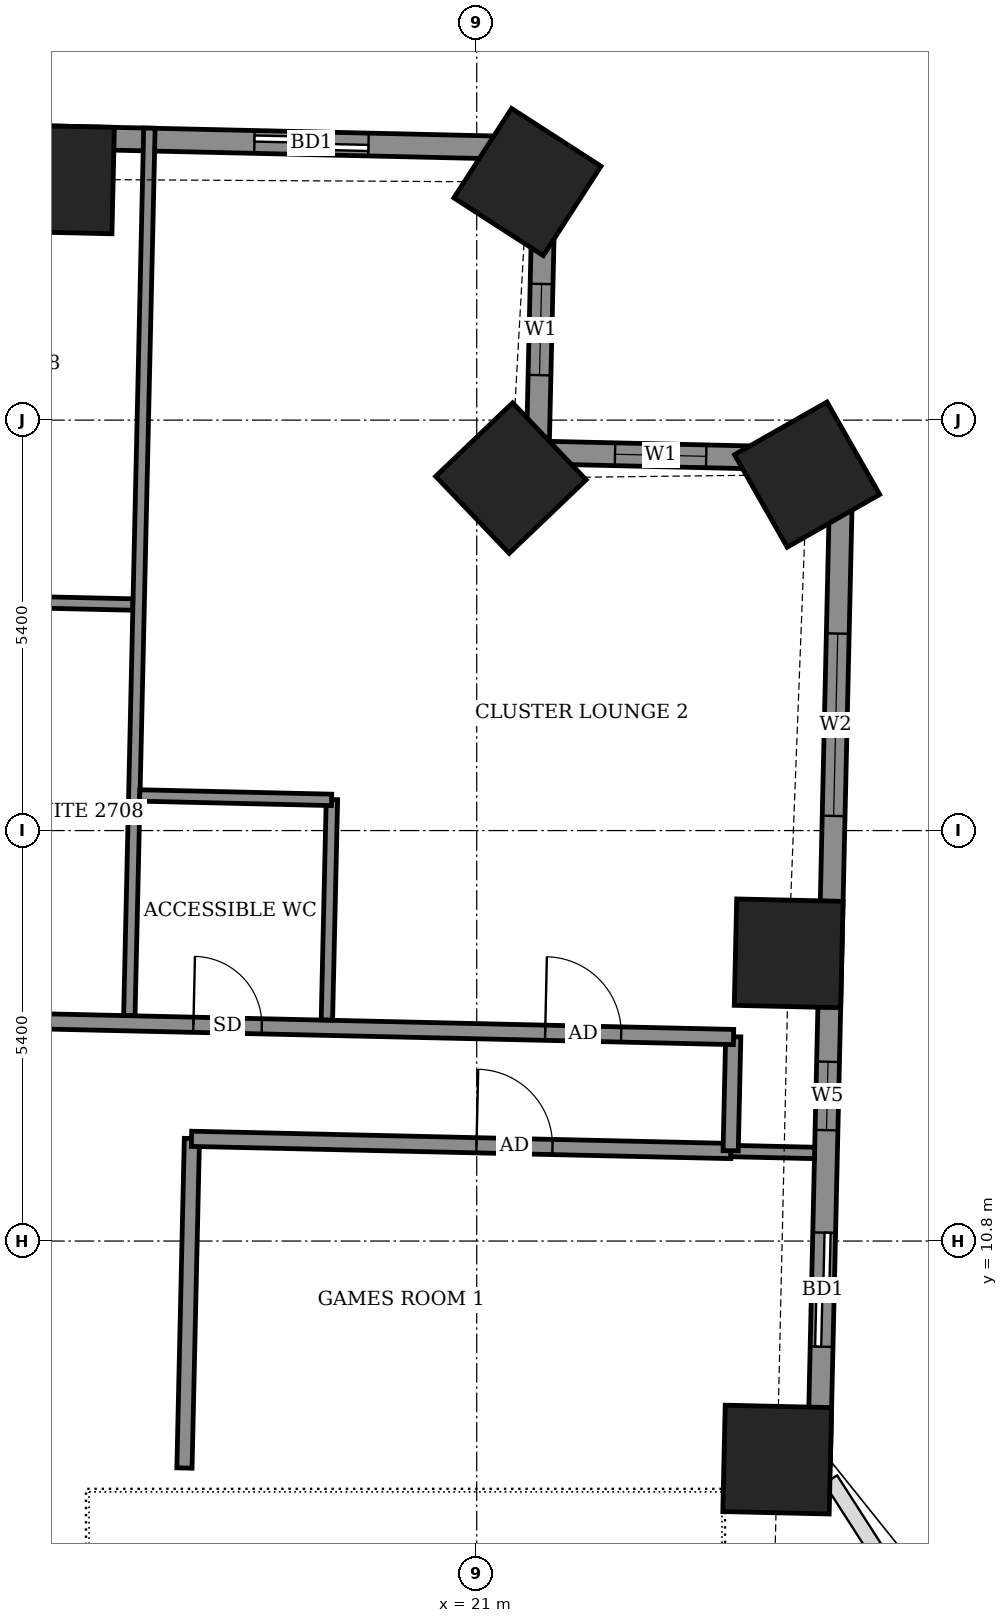
"""IFC4 building model, lengths in metres.
Left out: names, types, materials, properties, quantities, classifications, styles, units other than length and angle.
Written with IfcOpenShell. Run it as: python <this file> out.ifc"""

import sys

from ifc_helpers import new_model, si_unit, direction, frame, frame_2d, origin, origin_2d, place, context, subcontext, project, spatial, rectangle, extrude, element, fill, save


model = new_model("IFC4")
c1 = context("Model", 3, precision=1e-05, world=origin(), true_north=direction((0.0, 1.0)))
c2 = subcontext(c1, "Body", "Model", "MODEL_VIEW")
j1 = project(units=[si_unit("LENGTHUNIT", "METRE"), si_unit("PLANEANGLEUNIT", "RADIAN")], contexts=[c1])
p1 = place(None, origin())
s1 = spatial("IfcSite", under=j1, at=p1, CompositionType="ELEMENT")
p2 = place(p1, origin())
s2 = spatial("IfcBuilding", under=s1, at=p2, CompositionType="ELEMENT")
p3 = place(p2, frame((0.0, 0.0, 109.1)))
s3 = spatial("IfcBuildingStorey", under=s2, at=p3, CompositionType="ELEMENT", Elevation=109.1)
for number, where, z_axis, x_axis in (
    (1, (24.953, 7.925, -0.55), (0.0, 0.0, 1.0), (0.023, 1.0, 0.0)),
    (2, (25.104, 14.585, -0.55), (0.0, 0.0, 1.0), (0.023, 1.0, 0.0)),
    (3, (25.347, 20.883, -0.55), (0.0, 0.0, 1.0), (-0.495, 0.869, 0.0)),
    (4, (21.45, 20.837, -0.55), (0.0, 0.0, 1.0), (-0.691, 0.723, 0.0)),
    (5, (21.667, 24.732, -0.55), (0.0, 0.0, 1.0), (-0.84, 0.542, 0.0)),
    (6, (15.517, 24.767, -0.55), (0.0, 0.0, 1.0), (-1.0, 0.023, 0.0)),
):
    element("IfcColumn", number, at=place(p3, frame(where, z_axis=z_axis, x_axis=x_axis)), inside=s3, PredefinedType="COLUMN", context=c2, shape_type="SweptSolid", body=[
        extrude(rectangle(XDim=1.4, YDim=1.4, at=origin_2d()), origin(), (0.0, 0.0, 1.0), 3.6),
    ])
p4 = place(p3, frame((25.502, 7.857, 0.0), z_axis=(0.0, 0.0, 1.0), x_axis=(0.022680323815, 0.999742768372, 0.0)))
e7 = element("IfcWall", 7, at=p4, inside=s3, PredefinedType="SOLIDWALL", context=c2, shape_type="SweptSolid", body=[
    extrude(rectangle(XDim=13.229, YDim=0.3, at=frame_2d((6.615, 0.0))), origin(), (0.0, 0.0, 1.0), 3.05),
])
p5 = place(p4, frame((1.554, 0.0, 0.0)))
e8 = element("IfcOpeningElement", 8, at=p5, cuts=e7, PredefinedType="OPENING", context=c2, shape_type="SweptSolid", body=[
    extrude(rectangle(XDim=1.5, YDim=2.4, at=frame_2d((0.75, 1.2))), frame((0.0, 0.16, 0.0), z_axis=(0.0, -1.0, 0.0), x_axis=(1.0, 0.0, 0.0)), (0.0, 0.0, 1.0), 0.32),
])
p6 = place(p4, frame((4.403, 0.0, 0.9)))
e9 = element("IfcOpeningElement", 9, at=p6, cuts=e7, PredefinedType="OPENING", context=c2, shape_type="SweptSolid", body=[
    extrude(rectangle(XDim=0.9, YDim=1.5, at=frame_2d((0.45, 0.75))), frame((0.0, 0.16, 0.0), z_axis=(0.0, -1.0, 0.0), x_axis=(1.0, 0.0, 0.0)), (0.0, 0.0, 1.0), 0.32),
])
p7 = place(p4, frame((8.538, 0.0, 0.9)))
e10 = element("IfcOpeningElement", 10, at=p7, cuts=e7, PredefinedType="OPENING", context=c2, shape_type="SweptSolid", body=[
    extrude(rectangle(XDim=2.4, YDim=1.5, at=frame_2d((1.2, 0.75))), frame((0.0, 0.16, 0.0), z_axis=(0.0, -1.0, 0.0), x_axis=(1.0, 0.0, 0.0)), (0.0, 0.0, 1.0), 0.32),
])
p8 = place(p3, frame((25.802, 21.083, 0.0), z_axis=(0.0, 0.0, 1.0), x_axis=(-0.999740826251, 0.022765770952, 0.0)))
e11 = element("IfcWall", 11, at=p8, inside=s3, PredefinedType="SOLIDWALL", context=c2, shape_type="SweptSolid", body=[
    extrude(rectangle(XDim=4.0, YDim=0.3, at=frame_2d((2.0, 0.0))), origin(), (0.0, 0.0, 1.0), 2.55),
])
p9 = place(p8, frame((1.783, 0.0, 0.9)))
e12 = element("IfcOpeningElement", 12, at=p9, cuts=e11, PredefinedType="OPENING", context=c2, shape_type="SweptSolid", body=[
    extrude(rectangle(XDim=1.2, YDim=1.5, at=frame_2d((0.6, 0.75))), frame((0.0, 0.16, 0.0), z_axis=(0.0, -1.0, 0.0), x_axis=(1.0, 0.0, 0.0)), (0.0, 0.0, 1.0), 0.32),
])
p10 = place(p3, frame((21.803, 21.174, 0.0), z_axis=(0.0, 0.0, 1.0), x_axis=(0.022765770952, 0.999740826251, 0.0)))
e13 = element("IfcWall", 13, at=p10, inside=s3, PredefinedType="SOLIDWALL", context=c2, shape_type="SweptSolid", body=[
    extrude(rectangle(XDim=4.0, YDim=0.3, at=frame_2d((2.0, 0.0))), origin(), (0.0, 0.0, 1.0), 2.55),
])
p11 = place(p10, frame((1.018, 0.0, 0.9)))
e14 = element("IfcOpeningElement", 14, at=p11, cuts=e13, PredefinedType="OPENING", context=c2, shape_type="SweptSolid", body=[
    extrude(rectangle(XDim=1.2, YDim=1.5, at=frame_2d((0.6, 0.75))), frame((0.0, 0.16, 0.0), z_axis=(0.0, -1.0, 0.0), x_axis=(1.0, 0.0, 0.0)), (0.0, 0.0, 1.0), 0.32),
])
p12 = place(p3, frame((21.894, 25.173, 0.0), z_axis=(0.0, 0.0, 1.0), x_axis=(-0.999742661083, 0.022685052594, 0.0)))
e15 = element("IfcWall", 15, at=p12, inside=s3, PredefinedType="SOLIDWALL", context=c2, shape_type="SweptSolid", body=[
    extrude(rectangle(XDim=45.309, YDim=0.3, at=frame_2d((22.654, 0.0))), origin(), (0.0, 0.0, 1.0), 3.05),
])
p13 = place(p12, frame((2.319, 0.0, 0.0)))
e16 = element("IfcOpeningElement", 16, at=p13, cuts=e15, PredefinedType="OPENING", context=c2, shape_type="SweptSolid", body=[
    extrude(rectangle(XDim=1.5, YDim=2.4, at=frame_2d((0.75, 1.2))), frame((0.0, 0.16, 0.0), z_axis=(0.0, -1.0, 0.0), x_axis=(1.0, 0.0, 0.0)), (0.0, 0.0, 1.0), 0.32),
])
p14 = place(p12, frame((7.437, 0.0, 0.0)))
e17 = element("IfcOpeningElement", 17, at=p14, cuts=e15, PredefinedType="OPENING", context=c2, shape_type="SweptSolid", body=[
    extrude(rectangle(XDim=1.5, YDim=2.4, at=frame_2d((0.75, 1.2))), frame((0.0, 0.16, 0.0), z_axis=(0.0, -1.0, 0.0), x_axis=(1.0, 0.0, 0.0)), (0.0, 0.0, 1.0), 0.32),
])
p15 = place(p12, frame((10.244, 0.0, 0.0)))
e18 = element("IfcOpeningElement", 18, at=p15, cuts=e15, PredefinedType="OPENING", context=c2, shape_type="SweptSolid", body=[
    extrude(rectangle(XDim=1.5, YDim=2.4, at=frame_2d((0.75, 1.2))), frame((0.0, 0.16, 0.0), z_axis=(0.0, -1.0, 0.0), x_axis=(1.0, 0.0, 0.0)), (0.0, 0.0, 1.0), 0.32),
])
p16 = place(p12, frame((15.583, 0.0, 0.0)))
e19 = element("IfcOpeningElement", 19, at=p16, cuts=e15, PredefinedType="OPENING", context=c2, shape_type="SweptSolid", body=[
    extrude(rectangle(XDim=1.5, YDim=2.4, at=frame_2d((0.75, 1.2))), frame((0.0, 0.16, 0.0), z_axis=(0.0, -1.0, 0.0), x_axis=(1.0, 0.0, 0.0)), (0.0, 0.0, 1.0), 0.32),
])
p17 = place(p12, frame((20.677, 0.0, 0.0)))
e20 = element("IfcOpeningElement", 20, at=p17, cuts=e15, PredefinedType="OPENING", context=c2, shape_type="SweptSolid", body=[
    extrude(rectangle(XDim=1.5, YDim=2.4, at=frame_2d((0.75, 1.2))), frame((0.0, 0.16, 0.0), z_axis=(0.0, -1.0, 0.0), x_axis=(1.0, 0.0, 0.0)), (0.0, 0.0, 1.0), 0.32),
])
p18 = place(p12, frame((23.485, 0.0, 0.0)))
e21 = element("IfcOpeningElement", 21, at=p18, cuts=e15, PredefinedType="OPENING", context=c2, shape_type="SweptSolid", body=[
    extrude(rectangle(XDim=1.5, YDim=2.4, at=frame_2d((0.75, 1.2))), frame((0.0, 0.16, 0.0), z_axis=(0.0, -1.0, 0.0), x_axis=(1.0, 0.0, 0.0)), (0.0, 0.0, 1.0), 0.32),
])
p19 = place(p12, frame((28.708, 0.0, 0.0)))
e22 = element("IfcOpeningElement", 22, at=p19, cuts=e15, PredefinedType="OPENING", context=c2, shape_type="SweptSolid", body=[
    extrude(rectangle(XDim=1.5, YDim=2.4, at=frame_2d((0.75, 1.2))), frame((0.0, 0.16, 0.0), z_axis=(0.0, -1.0, 0.0), x_axis=(1.0, 0.0, 0.0)), (0.0, 0.0, 1.0), 0.32),
])
p20 = place(p12, frame((33.793, 0.0, 0.0)))
e23 = element("IfcOpeningElement", 23, at=p20, cuts=e15, PredefinedType="OPENING", context=c2, shape_type="SweptSolid", body=[
    extrude(rectangle(XDim=1.5, YDim=2.4, at=frame_2d((0.75, 1.2))), frame((0.0, 0.16, 0.0), z_axis=(0.0, -1.0, 0.0), x_axis=(1.0, 0.0, 0.0)), (0.0, 0.0, 1.0), 0.32),
])
p21 = place(p12, frame((36.6, 0.0, 0.0)))
e24 = element("IfcOpeningElement", 24, at=p21, cuts=e15, PredefinedType="OPENING", context=c2, shape_type="SweptSolid", body=[
    extrude(rectangle(XDim=1.5, YDim=2.4, at=frame_2d((0.75, 1.2))), frame((0.0, 0.16, 0.0), z_axis=(0.0, -1.0, 0.0), x_axis=(1.0, 0.0, 0.0)), (0.0, 0.0, 1.0), 0.32),
])
p22 = place(p12, frame((41.318, 0.0, 0.9)))
e25 = element("IfcOpeningElement", 25, at=p22, cuts=e15, PredefinedType="OPENING", context=c2, shape_type="SweptSolid", body=[
    extrude(rectangle(XDim=2.4, YDim=1.5, at=frame_2d((1.2, 0.75))), frame((0.0, 0.16, 0.0), z_axis=(0.0, -1.0, 0.0), x_axis=(1.0, 0.0, 0.0)), (0.0, 0.0, 1.0), 0.32),
])
p23 = place(p3, frame((17.155, 7.814, 0.0), z_axis=(0.0, 0.0, 1.0), x_axis=(0.022578158225, 0.999745080894, 0.0)))
e26 = element("IfcWall", 26, at=p23, inside=s3, PredefinedType="PARTITIONING", context=c2, shape_type="SweptSolid", body=[
    extrude(rectangle(XDim=4.336, YDim=0.2, at=frame_2d((2.168, 0.0))), origin(), (0.0, 0.0, 1.0), 3.05),
])
p24 = place(p3, frame((17.248, 12.145, 0.0), z_axis=(0.0, 0.0, 1.0), x_axis=(0.999742350192, -0.022698749566, 0.0)))
e27 = element("IfcWall", 27, at=p24, inside=s3, PredefinedType="PARTITIONING", context=c2, shape_type="SweptSolid", body=[
    extrude(rectangle(XDim=7.099, YDim=0.2, at=frame_2d((3.549, 0.0))), origin(), (0.0, 0.0, 1.0), 3.05),
])
p25 = place(p24, frame((3.75, 0.0, 0.0)))
e28 = element("IfcOpeningElement", 28, at=p25, cuts=e27, PredefinedType="OPENING", context=c2, shape_type="SweptSolid", body=[
    extrude(rectangle(XDim=1.0, YDim=2.1, at=frame_2d((0.5, 1.05))), frame((0.0, 0.11, 0.0), z_axis=(0.0, -1.0, 0.0), x_axis=(1.0, 0.0, 0.0)), (0.0, 0.0, 1.0), 0.22),
])
p26 = place(p3, frame((24.345, 11.984, 0.0), z_axis=(0.0, 0.0, 1.0), x_axis=(0.9997438932, -0.022630687329, 0.0)))
e29 = element("IfcWall", 29, at=p26, inside=s3, PredefinedType="PARTITIONING", context=c2, shape_type="SweptSolid", body=[
    extrude(rectangle(XDim=1.1, YDim=0.15, at=frame_2d((0.55, 0.0))), origin(), (0.0, 0.0, 1.0), 2.55),
])
p27 = place(p3, frame((24.341, 11.988, 0.0), z_axis=(0.0, 0.0, 1.0), x_axis=(0.022617910375, 0.999744182344, 0.0)))
e30 = element("IfcWall", 30, at=p27, inside=s3, PredefinedType="PARTITIONING", context=c2, shape_type="SweptSolid", body=[
    extrude(rectangle(XDim=1.5, YDim=0.2, at=frame_2d((0.75, 0.0))), origin(), (0.0, 0.0, 1.0), 3.05),
])
p28 = place(p3, frame((-26.316, 14.634, 0.0), z_axis=(0.0, 0.0, 1.0), x_axis=(0.999742734556, -0.02268181435, 0.0)))
e31 = element("IfcWall", 31, at=p28, inside=s3, PredefinedType="PARTITIONING", context=c2, shape_type="SweptSolid", body=[
    extrude(rectangle(XDim=50.708, YDim=0.2, at=frame_2d((25.354, 0.0))), origin(), (0.0, 0.0, 1.0), 3.05),
])
p29 = place(p28, frame((48.229, 0.0, 0.0)))
e32 = element("IfcOpeningElement", 32, at=p29, cuts=e31, PredefinedType="OPENING", context=c2, shape_type="SweptSolid", body=[
    extrude(rectangle(XDim=1.0, YDim=2.1, at=frame_2d((0.5, 1.05))), frame((0.0, 0.11, 0.0), z_axis=(0.0, -1.0, 0.0), x_axis=(1.0, 0.0, 0.0)), (0.0, 0.0, 1.0), 0.22),
])
p30 = place(p28, frame((43.6, 0.0, 0.0)))
e33 = element("IfcOpeningElement", 33, at=p30, cuts=e31, PredefinedType="OPENING", context=c2, shape_type="SweptSolid", body=[
    extrude(rectangle(XDim=0.9, YDim=2.1, at=frame_2d((0.45, 1.05))), frame((0.0, 0.11, 0.0), z_axis=(0.0, -1.0, 0.0), x_axis=(1.0, 0.0, 0.0)), (0.0, 0.0, 1.0), 0.22),
])
p31 = place(p28, frame((38.925, 0.0, 0.0)))
e34 = element("IfcOpeningElement", 34, at=p31, cuts=e31, PredefinedType="OPENING", context=c2, shape_type="SweptSolid", body=[
    extrude(rectangle(XDim=0.9, YDim=2.1, at=frame_2d((0.45, 1.05))), frame((0.0, 0.11, 0.0), z_axis=(0.0, -1.0, 0.0), x_axis=(1.0, 0.0, 0.0)), (0.0, 0.0, 1.0), 0.22),
])
p32 = place(p28, frame((36.9, 0.0, 0.0)))
e35 = element("IfcOpeningElement", 35, at=p32, cuts=e31, PredefinedType="OPENING", context=c2, shape_type="SweptSolid", body=[
    extrude(rectangle(XDim=0.9, YDim=2.1, at=frame_2d((0.45, 1.05))), frame((0.0, 0.11, 0.0), z_axis=(0.0, -1.0, 0.0), x_axis=(1.0, 0.0, 0.0)), (0.0, 0.0, 1.0), 0.22),
])
p33 = place(p28, frame((29.975, 0.0, 0.0)))
e36 = element("IfcOpeningElement", 36, at=p33, cuts=e31, PredefinedType="OPENING", context=c2, shape_type="SweptSolid", body=[
    extrude(rectangle(XDim=0.9, YDim=2.1, at=frame_2d((0.45, 1.05))), frame((0.0, 0.11, 0.0), z_axis=(0.0, -1.0, 0.0), x_axis=(1.0, 0.0, 0.0)), (0.0, 0.0, 1.0), 0.22),
])
p34 = place(p28, frame((27.9, 0.0, 0.0)))
e37 = element("IfcOpeningElement", 37, at=p34, cuts=e31, PredefinedType="OPENING", context=c2, shape_type="SweptSolid", body=[
    extrude(rectangle(XDim=0.9, YDim=2.1, at=frame_2d((0.45, 1.05))), frame((0.0, 0.11, 0.0), z_axis=(0.0, -1.0, 0.0), x_axis=(1.0, 0.0, 0.0)), (0.0, 0.0, 1.0), 0.22),
])
p35 = place(p28, frame((21.175, 0.0, 0.0)))
e38 = element("IfcOpeningElement", 38, at=p35, cuts=e31, PredefinedType="OPENING", context=c2, shape_type="SweptSolid", body=[
    extrude(rectangle(XDim=0.9, YDim=2.1, at=frame_2d((0.45, 1.05))), frame((0.0, 0.11, 0.0), z_axis=(0.0, -1.0, 0.0), x_axis=(1.0, 0.0, 0.0)), (0.0, 0.0, 1.0), 0.22),
])
p36 = place(p28, frame((19.25, 0.0, 0.0)))
e39 = element("IfcOpeningElement", 39, at=p36, cuts=e31, PredefinedType="OPENING", context=c2, shape_type="SweptSolid", body=[
    extrude(rectangle(XDim=0.9, YDim=2.1, at=frame_2d((0.45, 1.05))), frame((0.0, 0.11, 0.0), z_axis=(0.0, -1.0, 0.0), x_axis=(1.0, 0.0, 0.0)), (0.0, 0.0, 1.0), 0.22),
])
p37 = place(p28, frame((12.375, 0.0, 0.0)))
e40 = element("IfcOpeningElement", 40, at=p37, cuts=e31, PredefinedType="OPENING", context=c2, shape_type="SweptSolid", body=[
    extrude(rectangle(XDim=0.9, YDim=2.1, at=frame_2d((0.45, 1.05))), frame((0.0, 0.11, 0.0), z_axis=(0.0, -1.0, 0.0), x_axis=(1.0, 0.0, 0.0)), (0.0, 0.0, 1.0), 0.22),
])
p38 = place(p28, frame((10.225, 0.0, 0.0)))
e41 = element("IfcOpeningElement", 41, at=p38, cuts=e31, PredefinedType="OPENING", context=c2, shape_type="SweptSolid", body=[
    extrude(rectangle(XDim=0.9, YDim=2.1, at=frame_2d((0.45, 1.05))), frame((0.0, 0.11, 0.0), z_axis=(0.0, -1.0, 0.0), x_axis=(1.0, 0.0, 0.0)), (0.0, 0.0, 1.0), 0.22),
])
p39 = place(p28, frame((0.85, 0.0, 0.0)))
e42 = element("IfcOpeningElement", 42, at=p39, cuts=e31, PredefinedType="OPENING", context=c2, shape_type="SweptSolid", body=[
    extrude(rectangle(XDim=1.0, YDim=2.1, at=frame_2d((0.5, 1.05))), frame((0.0, 0.11, 0.0), z_axis=(0.0, -1.0, 0.0), x_axis=(1.0, 0.0, 0.0)), (0.0, 0.0, 1.0), 0.22),
])
p40 = place(p28, frame((5.55, 0.0, 0.0)))
e43 = element("IfcOpeningElement", 43, at=p40, cuts=e31, PredefinedType="OPENING", context=c2, shape_type="SweptSolid", body=[
    extrude(rectangle(XDim=0.9, YDim=2.1, at=frame_2d((0.45, 1.05))), frame((0.0, 0.11, 0.0), z_axis=(0.0, -1.0, 0.0), x_axis=(1.0, 0.0, 0.0)), (0.0, 0.0, 1.0), 0.22),
])
p41 = place(p3, frame((16.43, 13.768, 0.0), z_axis=(0.0, 0.0, 1.0), x_axis=(0.022624509406, 0.999744033028, 0.0)))
e44 = element("IfcWall", 44, at=p41, inside=s3, PredefinedType="PARTITIONING", context=c2, shape_type="SweptSolid", body=[
    extrude(rectangle(XDim=11.676, YDim=0.15, at=frame_2d((5.838, 0.0))), origin(), (0.0, 0.0, 1.0), 2.55),
])
p42 = place(p3, frame((19.029, 13.709, 0.0), z_axis=(0.0, 0.0, 1.0), x_axis=(0.022732880677, 0.999741574676, 0.0)))
e45 = element("IfcWall", 45, at=p42, inside=s3, PredefinedType="PARTITIONING", context=c2, shape_type="SweptSolid", body=[
    extrude(rectangle(XDim=2.9, YDim=0.15, at=frame_2d((1.45, 0.0))), origin(), (0.0, 0.0, 1.0), 3.05),
])
p43 = place(p3, frame((16.566, 16.662, 0.0), z_axis=(0.0, 0.0, 1.0), x_axis=(0.999735358199, -0.023004642294, 0.0)))
e46 = element("IfcWall", 46, at=p43, inside=s3, PredefinedType="PARTITIONING", context=c2, shape_type="SweptSolid", body=[
    extrude(rectangle(XDim=2.526, YDim=0.15, at=frame_2d((1.263, 0.0))), origin(), (0.0, 0.0, 1.0), 3.05),
])
p44 = place(p3, frame((14.149, 19.227, 0.0), z_axis=(0.0, 0.0, 1.0), x_axis=(0.999740260747, -0.02279059109, 0.0)))
e47 = element("IfcWall", 47, at=p44, inside=s3, PredefinedType="PARTITIONING", context=c2, shape_type="SweptSolid", body=[
    extrude(rectangle(XDim=2.324, YDim=0.15, at=frame_2d((1.162, 0.0))), origin(), (0.0, 0.0, 1.0), 3.05),
])
p45 = place(p5, origin())
e48 = element("IfcDoor", 48, at=p45, inside=s3, OperationType="SLIDING_TO_LEFT", PredefinedType="DOOR", context=c2, shape_type="SweptSolid", body=[
    extrude(rectangle(XDim=1.5, YDim=2.4, at=frame_2d((0.75, 1.2))), frame((0.0, 0.025, 0.0), z_axis=(0.0, -1.0, 0.0), x_axis=(1.0, 0.0, 0.0)), (0.0, 0.0, 1.0), 0.05),
])
fill(e8, e48)
p46 = place(p6, origin())
e49 = element("IfcWindow", 49, at=p46, inside=s3, PartitioningType="SINGLE_PANEL", PredefinedType="WINDOW", context=c2, shape_type="SweptSolid", body=[
    extrude(rectangle(XDim=0.9, YDim=1.5, at=frame_2d((0.45, 0.75))), frame((0.0, 0.03, 0.0), z_axis=(0.0, -1.0, 0.0), x_axis=(1.0, 0.0, 0.0)), (0.0, 0.0, 1.0), 0.06),
])
fill(e9, e49)
p47 = place(p7, origin())
e50 = element("IfcWindow", 50, at=p47, inside=s3, PartitioningType="DOUBLE_PANEL_VERTICAL", PredefinedType="WINDOW", context=c2, shape_type="SweptSolid", body=[
    extrude(rectangle(XDim=2.4, YDim=1.5, at=frame_2d((1.2, 0.75))), frame((0.0, 0.03, 0.0), z_axis=(0.0, -1.0, 0.0), x_axis=(1.0, 0.0, 0.0)), (0.0, 0.0, 1.0), 0.06),
])
fill(e10, e50)
p48 = place(p9, origin())
e51 = element("IfcWindow", 51, at=p48, inside=s3, PartitioningType="SINGLE_PANEL", PredefinedType="WINDOW", context=c2, shape_type="SweptSolid", body=[
    extrude(rectangle(XDim=1.2, YDim=1.5, at=frame_2d((0.6, 0.75))), frame((0.0, 0.03, 0.0), z_axis=(0.0, -1.0, 0.0), x_axis=(1.0, 0.0, 0.0)), (0.0, 0.0, 1.0), 0.06),
])
fill(e12, e51)
p49 = place(p11, origin())
e52 = element("IfcWindow", 52, at=p49, inside=s3, PartitioningType="SINGLE_PANEL", PredefinedType="WINDOW", context=c2, shape_type="SweptSolid", body=[
    extrude(rectangle(XDim=1.2, YDim=1.5, at=frame_2d((0.6, 0.75))), frame((0.0, 0.03, 0.0), z_axis=(0.0, -1.0, 0.0), x_axis=(1.0, 0.0, 0.0)), (0.0, 0.0, 1.0), 0.06),
])
fill(e14, e52)
p50 = place(p13, origin())
e53 = element("IfcDoor", 53, at=p50, inside=s3, OperationType="SLIDING_TO_LEFT", PredefinedType="DOOR", context=c2, shape_type="SweptSolid", body=[
    extrude(rectangle(XDim=1.5, YDim=2.4, at=frame_2d((0.75, 1.2))), frame((0.0, 0.025, 0.0), z_axis=(0.0, -1.0, 0.0), x_axis=(1.0, 0.0, 0.0)), (0.0, 0.0, 1.0), 0.05),
])
fill(e16, e53)
p51 = place(p25, origin())
e54 = element("IfcDoor", 54, at=p51, inside=s3, OperationType="SINGLE_SWING_RIGHT", PredefinedType="DOOR", context=c2, shape_type="SweptSolid", body=[
    extrude(rectangle(XDim=1.0, YDim=2.1, at=frame_2d((0.5, 1.05))), frame((0.0, 0.025, 0.0), z_axis=(0.0, -1.0, 0.0), x_axis=(1.0, 0.0, 0.0)), (0.0, 0.0, 1.0), 0.05),
])
fill(e28, e54)
p52 = place(p29, origin())
e55 = element("IfcDoor", 55, at=p52, inside=s3, OperationType="SINGLE_SWING_LEFT", PredefinedType="DOOR", context=c2, shape_type="SweptSolid", body=[
    extrude(rectangle(XDim=1.0, YDim=2.1, at=frame_2d((0.5, 1.05))), frame((0.0, 0.025, 0.0), z_axis=(0.0, -1.0, 0.0), x_axis=(1.0, 0.0, 0.0)), (0.0, 0.0, 1.0), 0.05),
])
fill(e32, e55)
p53 = place(p30, origin())
e56 = element("IfcDoor", 56, at=p53, inside=s3, OperationType="SINGLE_SWING_RIGHT", PredefinedType="DOOR", context=c2, shape_type="SweptSolid", body=[
    extrude(rectangle(XDim=0.9, YDim=2.1, at=frame_2d((0.45, 1.05))), frame((0.0, 0.025, 0.0), z_axis=(0.0, -1.0, 0.0), x_axis=(1.0, 0.0, 0.0)), (0.0, 0.0, 1.0), 0.05),
])
fill(e33, e56)
save(model, sys.argv[1])
